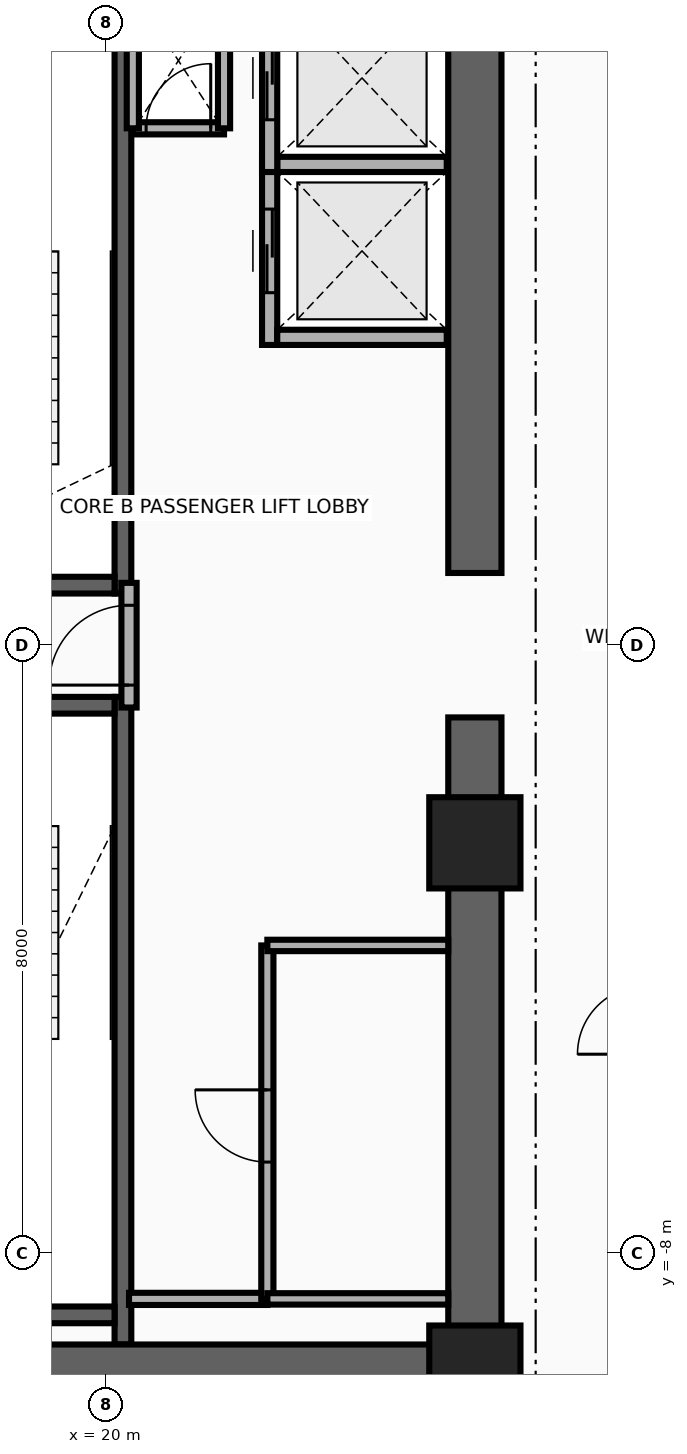
"""IFC4 building model, lengths in metres.
Left out: names, types, materials, properties, quantities, classifications, styles, units other than length and angle.
Written with IfcOpenShell. Run it as: python <this file> out.ifc"""

import sys

from ifc_helpers import new_model, si_unit, direction, frame, frame_2d, origin, origin_2d, place, context, subcontext, project, spatial, rectangle, extrude, source, transform, mapped, element, fill, save


model = new_model("IFC4")
c1 = context("Model", 3, precision=1e-05, world=origin(), true_north=direction((0.0, 1.0)))
c2 = subcontext(c1, "Body", "Model", "MODEL_VIEW")
j1 = project(units=[si_unit("LENGTHUNIT", "METRE"), si_unit("PLANEANGLEUNIT", "RADIAN")], contexts=[c1])
p1 = place(None, origin())
s1 = spatial("IfcSite", under=j1, at=p1, CompositionType="ELEMENT")
p2 = place(p1, origin())
s2 = spatial("IfcBuilding", under=s1, at=p2, CompositionType="ELEMENT")
p3 = place(p2, frame((0.0, 0.0, 135.3)))
s3 = spatial("IfcBuildingStorey", under=s2, at=p3, CompositionType="ELEMENT", Elevation=135.3)
p4 = place(p3, frame((20.22, 0.68, 0.0), z_axis=(0.0, 0.0, 1.0), x_axis=(0.0, 1.0, 0.0)))
e1 = element("IfcWall", 1, at=p4, inside=s3, PredefinedType="SHEAR", context=c2, shape_type="SweptSolid", body=[
    extrude(rectangle(XDim=8.52, YDim=0.22, at=frame_2d((4.26, 0.0))), origin(), (0.0, 0.0, 1.0), 3.46),
])
p5 = place(p3, frame((17.0, 0.79, 0.0), z_axis=(0.0, 0.0, 1.0), x_axis=(1.0, 0.0, 0.0)))
e2 = element("IfcWall", 2, at=p5, inside=s3, PredefinedType="SHEAR", context=c2, shape_type="SweptSolid", body=[
    extrude(rectangle(XDim=3.11, YDim=0.22, at=frame_2d((1.555, 0.0))), origin(), (0.0, 0.0, 1.0), 3.46),
])
p6 = place(p5, frame((0.95, 0.0, 0.0)))
e3 = element("IfcOpeningElement", 3, at=p6, cuts=e2, PredefinedType="OPENING", context=c2, shape_type="SweptSolid", body=[
    extrude(rectangle(XDim=1.1, YDim=2.15, at=frame_2d((0.55, 1.075))), frame((0.0, 0.125, 0.0), z_axis=(0.0, -1.0, 0.0), x_axis=(1.0, 0.0, 0.0)), (0.0, 0.0, 1.0), 0.25),
])
p7 = place(p3, frame((20.22, -9.2, 0.0), z_axis=(0.0, 0.0, 1.0), x_axis=(0.0, 1.0, 0.0)))
e4 = element("IfcWall", 4, at=p7, inside=s3, PredefinedType="SHEAR", context=c2, shape_type="SweptSolid", body=[
    extrude(rectangle(XDim=8.52, YDim=0.22, at=frame_2d((4.26, 0.0))), origin(), (0.0, 0.0, 1.0), 3.46),
])
p8 = place(p3, frame((17.0, -8.81, 0.0), z_axis=(0.0, 0.0, 1.0), x_axis=(1.0, 0.0, 0.0)))
e5 = element("IfcWall", 5, at=p8, inside=s3, PredefinedType="SHEAR", context=c2, shape_type="SweptSolid", body=[
    extrude(rectangle(XDim=3.11, YDim=0.22, at=frame_2d((1.555, 0.0))), origin(), (0.0, 0.0, 1.0), 3.46),
])
p9 = place(p3, frame((17.0, -0.79, 0.0), z_axis=(0.0, 0.0, 1.0), x_axis=(1.0, 0.0, 0.0)))
e6 = element("IfcWall", 6, at=p9, inside=s3, PredefinedType="SHEAR", context=c2, shape_type="SweptSolid", body=[
    extrude(rectangle(XDim=3.11, YDim=0.22, at=frame_2d((1.555, 0.0))), origin(), (0.0, 0.0, 1.0), 3.46),
])
p10 = place(p9, frame((0.95, 0.0, 0.0)))
e7 = element("IfcOpeningElement", 7, at=p10, cuts=e6, PredefinedType="OPENING", context=c2, shape_type="SweptSolid", body=[
    extrude(rectangle(XDim=1.1, YDim=2.15, at=frame_2d((0.55, 1.075))), frame((0.0, 0.125, 0.0), z_axis=(0.0, -1.0, 0.0), x_axis=(1.0, 0.0, 0.0)), (0.0, 0.0, 1.0), 0.25),
])
for number, where, z_axis, x_axis in (
    (8, (24.85, -9.9, 0.0), (0.0, 0.0, 1.0), (0.0, 1.0, 0.0)),
    (9, (24.85, 0.95, 0.0), (0.0, 0.0, 1.0), (0.0, 1.0, 0.0)),
):
    element("IfcWall", number, at=place(p3, frame(where, z_axis=z_axis, x_axis=x_axis)), inside=s3, PredefinedType="SHEAR", context=c2, shape_type="SweptSolid", body=[
        extrude(rectangle(XDim=8.95, YDim=0.7, at=frame_2d((4.475, 0.0))), origin(), (0.0, 0.0, 1.0), 3.46),
    ])
p11 = place(p3, frame((15.85, -9.55, 0.0), z_axis=(0.0, 0.0, 1.0), x_axis=(1.0, 0.0, 0.0)))
e10 = element("IfcWall", 10, at=p11, inside=s3, PredefinedType="SHEAR", context=c2, shape_type="SweptSolid", body=[
    extrude(rectangle(XDim=9.0, YDim=0.7, at=frame_2d((4.5, 0.0))), origin(), (0.0, 0.0, 1.0), 3.46),
])
m1 = source(origin(), c2, "Body", "SweptSolid", [
    extrude(rectangle(XDim=1.2, YDim=1.2, at=origin_2d()), origin(), (0.0, 0.0, 1.0), 3.7),
])
for number, where, z_axis, x_axis in (
    (11, (24.85, -9.55, 0.0), (0.0, 0.0, 1.0), (1.0, 0.0, 0.0)),
    (12, (24.85, -2.6, 0.0), (0.0, 0.0, 1.0), (1.0, 0.0, 0.0)),
):
    element("IfcColumn", number, at=place(p3, frame(where, z_axis=z_axis, x_axis=x_axis)), inside=s3, PredefinedType="COLUMN", context=c2, shape_type="MappedRepresentation", body=[
        mapped(m1, transform((0.0, 0.0, 0.0), x_axis=(1.0, 0.0, 0.0), y_axis=(0.0, 1.0, 0.0), z_axis=(0.0, 0.0, 1.0), scale=1.0)),
    ])
p12 = place(p3, frame((22.15, 3.95, 0.0), z_axis=(0.0, 0.0, 1.0), x_axis=(0.0, 1.0, 0.0)))
e13 = element("IfcWall", 13, at=p12, inside=s3, PredefinedType="MOVABLE", context=c2, shape_type="SweptSolid", body=[
    extrude(rectangle(XDim=2.475, YDim=0.2, at=frame_2d((1.238, 0.0))), origin(), (0.0, 0.0, 1.0), 3.46),
])
p13 = place(p12, frame((0.688, 0.0, 0.0)))
e14 = element("IfcOpeningElement", 14, at=p13, cuts=e13, PredefinedType="OPENING", context=c2, shape_type="SweptSolid", body=[
    extrude(rectangle(XDim=1.1, YDim=2.1, at=frame_2d((0.55, 1.05))), frame((0.0, 0.115, 0.0), z_axis=(0.0, -1.0, 0.0), x_axis=(1.0, 0.0, 0.0)), (0.0, 0.0, 1.0), 0.23),
])
for number, where, z_axis, x_axis in (
    (15, (22.25, 4.05, 0.0), (0.0, 0.0, 1.0), (1.0, 0.0, 0.0)),
    (16, (22.25, 6.325, 0.0), (0.0, 0.0, 1.0), (1.0, 0.0, 0.0)),
):
    element("IfcWall", number, at=place(p3, frame(where, z_axis=z_axis, x_axis=x_axis)), inside=s3, PredefinedType="MOVABLE", context=c2, shape_type="SweptSolid", body=[
        extrude(rectangle(XDim=2.23, YDim=0.2, at=frame_2d((1.115, 0.0))), origin(), (0.0, 0.0, 1.0), 2.245),
    ])
p14 = place(p3, frame((22.15, 6.225, 0.0), z_axis=(0.0, 0.0, 1.0), x_axis=(0.0, 1.0, 0.0)))
e17 = element("IfcWall", 17, at=p14, inside=s3, PredefinedType="MOVABLE", context=c2, shape_type="SweptSolid", body=[
    extrude(rectangle(XDim=2.475, YDim=0.2, at=frame_2d((1.237, 0.0))), origin(), (0.0, 0.0, 1.0), 3.46),
])
p15 = place(p14, frame((0.688, 0.0, 0.0)))
e18 = element("IfcOpeningElement", 18, at=p15, cuts=e17, PredefinedType="OPENING", context=c2, shape_type="SweptSolid", body=[
    extrude(rectangle(XDim=1.1, YDim=2.1, at=frame_2d((0.55, 1.05))), frame((0.0, 0.115, 0.0), z_axis=(0.0, -1.0, 0.0), x_axis=(1.0, 0.0, 0.0)), (0.0, 0.0, 1.0), 0.23),
])
p16 = place(p3, frame((20.3, -0.82, 0.0), z_axis=(0.0, 0.0, 1.0), x_axis=(0.0, 1.0, 0.0)))
e19 = element("IfcWall", 19, at=p16, inside=s3, PredefinedType="PARTITIONING", context=c2, shape_type="SweptSolid", body=[
    extrude(rectangle(XDim=1.64, YDim=0.2, at=frame_2d((0.82, 0.0))), origin(), (0.0, 0.0, 1.0), 3.46),
])
p17 = place(p16, frame((0.295, 0.0, 0.0)))
e20 = element("IfcOpeningElement", 20, at=p17, cuts=e19, PredefinedType="OPENING", context=c2, shape_type="SweptSolid", body=[
    extrude(rectangle(XDim=1.05, YDim=2.15, at=frame_2d((0.525, 1.075))), frame((0.0, 0.115, 0.0), z_axis=(0.0, -1.0, 0.0), x_axis=(1.0, 0.0, 0.0)), (0.0, 0.0, 1.0), 0.23),
])
p18 = place(p3, frame((20.35, 6.8, 0.0), z_axis=(0.0, 0.0, 1.0), x_axis=(1.0, 0.0, 0.0)))
e21 = element("IfcWall", 21, at=p18, inside=s3, PredefinedType="PARTITIONING", context=c2, shape_type="SweptSolid", body=[
    extrude(rectangle(XDim=1.2, YDim=0.16, at=frame_2d((0.6, 0.0))), origin(), (0.0, 0.0, 1.0), 3.46),
])
p19 = place(p18, frame((0.175, 0.0, 0.0)))
e22 = element("IfcOpeningElement", 22, at=p19, cuts=e21, PredefinedType="OPENING", context=c2, shape_type="SweptSolid", body=[
    extrude(rectangle(XDim=0.85, YDim=2.05, at=frame_2d((0.425, 1.025))), frame((0.0, 0.095, 0.0), z_axis=(0.0, -1.0, 0.0), x_axis=(1.0, 0.0, 0.0)), (0.0, 0.0, 1.0), 0.19),
])
for number, where, z_axis, x_axis in (
    (23, (21.55, 6.8, 0.0), (0.0, 0.0, 1.0), (0.0, 1.0, 0.0)),
    (24, (20.35, 6.8, 0.0), (0.0, 0.0, 1.0), (0.0, 1.0, 0.0)),
):
    element("IfcWall", number, at=place(p3, frame(where, z_axis=z_axis, x_axis=x_axis)), inside=s3, PredefinedType="PARTITIONING", context=c2, shape_type="SweptSolid", body=[
        extrude(rectangle(XDim=1.8, YDim=0.16, at=frame_2d((0.9, 0.0))), origin(), (0.0, 0.0, 1.0), 3.46),
    ])
p20 = place(p3, frame((20.3, -8.6, 0.0), z_axis=(0.0, 0.0, 1.0), x_axis=(1.0, 0.0, 0.0)))
e25 = element("IfcWall", 25, at=p20, inside=s3, PredefinedType="PARTITIONING", context=c2, shape_type="SweptSolid", body=[
    extrude(rectangle(XDim=1.82, YDim=0.16, at=frame_2d((0.91, 0.0))), origin(), (0.0, 0.0, 1.0), 3.46),
])
p21 = place(p3, frame((22.12, -8.6, 0.0), z_axis=(0.0, 0.0, 1.0), x_axis=(0.0, 1.0, 0.0)))
e26 = element("IfcWall", 26, at=p21, inside=s3, PredefinedType="PARTITIONING", context=c2, shape_type="SweptSolid", body=[
    extrude(rectangle(XDim=4.65, YDim=0.16, at=frame_2d((2.325, 0.0))), origin(), (0.0, 0.0, 1.0), 3.46),
])
p22 = place(p21, frame((1.8, 0.0, 0.0)))
e27 = element("IfcOpeningElement", 27, at=p22, cuts=e26, PredefinedType="OPENING", context=c2, shape_type="SweptSolid", body=[
    extrude(rectangle(XDim=0.95, YDim=2.15, at=frame_2d((0.475, 1.075))), frame((0.0, 0.095, 0.0), z_axis=(0.0, -1.0, 0.0), x_axis=(1.0, 0.0, 0.0)), (0.0, 0.0, 1.0), 0.19),
])
for number, where, z_axis, x_axis in (
    (28, (22.12, -3.95, 0.0), (0.0, 0.0, 1.0), (1.0, 0.0, 0.0)),
    (29, (22.12, -8.6, 0.0), (0.0, 0.0, 1.0), (1.0, 0.0, 0.0)),
):
    element("IfcWall", number, at=place(p3, frame(where, z_axis=z_axis, x_axis=x_axis)), inside=s3, PredefinedType="PARTITIONING", context=c2, shape_type="SweptSolid", body=[
        extrude(rectangle(XDim=2.38, YDim=0.15, at=frame_2d((1.19, 0.0))), origin(), (0.0, 0.0, 1.0), 3.46),
    ])
p23 = place(p13, origin())
e30 = element("IfcDoor", 30, at=p23, inside=s3, OperationType="DOUBLE_DOOR_SLIDING", PredefinedType="DOOR", context=c2, shape_type="SweptSolid", body=[
    extrude(rectangle(XDim=1.1, YDim=2.1, at=frame_2d((0.55, 1.05))), frame((0.0, 0.025, 0.0), z_axis=(0.0, -1.0, 0.0), x_axis=(1.0, 0.0, 0.0)), (0.0, 0.0, 1.0), 0.05),
])
fill(e14, e30)
p24 = place(p15, origin())
e31 = element("IfcDoor", 31, at=p24, inside=s3, OperationType="DOUBLE_DOOR_SLIDING", PredefinedType="DOOR", context=c2, shape_type="SweptSolid", body=[
    extrude(rectangle(XDim=1.1, YDim=2.1, at=frame_2d((0.55, 1.05))), frame((0.0, 0.025, 0.0), z_axis=(0.0, -1.0, 0.0), x_axis=(1.0, 0.0, 0.0)), (0.0, 0.0, 1.0), 0.05),
])
fill(e18, e31)
p25 = place(p17, origin())
e32 = element("IfcDoor", 32, at=p25, inside=s3, OperationType="SINGLE_SWING_RIGHT", PredefinedType="DOOR", context=c2, shape_type="SweptSolid", body=[
    extrude(rectangle(XDim=1.05, YDim=2.15, at=frame_2d((0.525, 1.075))), frame((0.0, 0.025, 0.0), z_axis=(0.0, -1.0, 0.0), x_axis=(1.0, 0.0, 0.0)), (0.0, 0.0, 1.0), 0.05),
])
fill(e20, e32)
p26 = place(p19, origin())
e33 = element("IfcDoor", 33, at=p26, inside=s3, OperationType="SINGLE_SWING_LEFT", PredefinedType="DOOR", context=c2, shape_type="SweptSolid", body=[
    extrude(rectangle(XDim=0.85, YDim=2.05, at=frame_2d((0.425, 1.025))), frame((0.0, 0.025, 0.0), z_axis=(0.0, -1.0, 0.0), x_axis=(1.0, 0.0, 0.0)), (0.0, 0.0, 1.0), 0.05),
])
fill(e22, e33)
p27 = place(p22, origin())
e34 = element("IfcDoor", 34, at=p27, inside=s3, OperationType="SINGLE_SWING_RIGHT", PredefinedType="DOOR", context=c2, shape_type="SweptSolid", body=[
    extrude(rectangle(XDim=0.95, YDim=2.15, at=frame_2d((0.475, 1.075))), frame((0.0, 0.025, 0.0), z_axis=(0.0, -1.0, 0.0), x_axis=(1.0, 0.0, 0.0)), (0.0, 0.0, 1.0), 0.05),
])
fill(e27, e34)
save(model, sys.argv[1])
